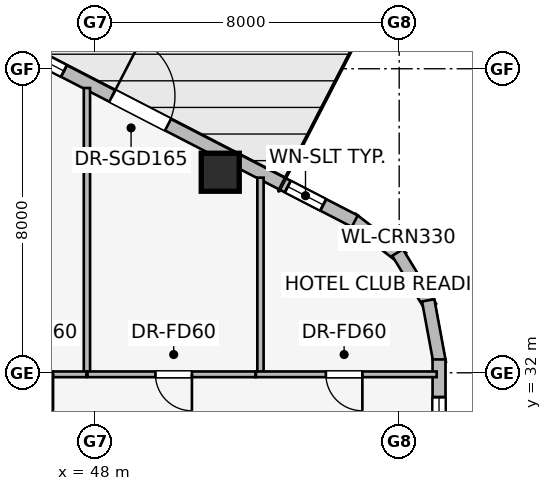
"""IFC4 building model, lengths in metres.
Left out: names, types, materials, properties, quantities, classifications, styles, units other than length and angle.
Written with IfcOpenShell. Run it as: python <this file> out.ifc"""

import sys

from ifc_helpers import new_model, si_unit, direction, frame, frame_2d, origin, origin_2d, place, context, subcontext, project, spatial, rectangle, extrude, element, fill, save


model = new_model("IFC4")
c1 = context("Model", 3, precision=1e-05, world=origin(), true_north=direction((0.0, 1.0)))
c2 = subcontext(c1, "Body", "Model", "MODEL_VIEW")
j1 = project(units=[si_unit("LENGTHUNIT", "METRE"), si_unit("PLANEANGLEUNIT", "RADIAN")], contexts=[c1])
p1 = place(None, origin())
s1 = spatial("IfcSite", under=j1, at=p1, CompositionType="ELEMENT")
p2 = place(p1, origin())
s2 = spatial("IfcBuilding", under=s1, at=p2, CompositionType="ELEMENT")
p3 = place(p2, frame((0.0, 0.0, 122.25)))
s3 = spatial("IfcBuildingStorey", under=s2, at=p3, CompositionType="ELEMENT", Elevation=122.25)
p4 = place(p3, frame((51.291, 37.277, 0.0), z_axis=(0.0, 0.0, 1.0), x_axis=(1.0, 0.0, 0.0)))
e1 = element("IfcColumn", 1, at=p4, inside=s3, PredefinedType="COLUMN", context=c2, shape_type="SweptSolid", body=[
    extrude(rectangle(XDim=1.0, YDim=1.0, at=origin_2d()), origin(), (0.0, 0.0, 1.0), 3.45),
])
p5 = place(p3, frame((54.757, 36.05, 0.0), z_axis=(0.0, 0.0, 1.0), x_axis=(0.790621329885, -0.612305408053, 0.0)))
e2 = element("IfcWall", 2, at=p5, inside=s3, PredefinedType="STANDARD", context=c2, shape_type="SweptSolid", body=[
    extrude(rectangle(XDim=1.676, YDim=0.33, at=frame_2d((0.838, 0.0))), origin(), (0.0, 0.0, 1.0), 3.19),
])
p6 = place(p3, frame((55.957, 35.164, 0.0), z_axis=(0.0, 0.0, 1.0), x_axis=(0.520519429557, -0.853849824883, 0.0)))
e3 = element("IfcWall", 3, at=p6, inside=s3, PredefinedType="STANDARD", context=c2, shape_type="SweptSolid", body=[
    extrude(rectangle(XDim=1.677, YDim=0.33, at=frame_2d((0.839, 0.0))), origin(), (0.0, 0.0, 1.0), 3.19),
])
p7 = place(p3, frame((56.763, 33.907, 0.0), z_axis=(0.0, 0.0, 1.0), x_axis=(0.181984991895, -0.983301308209, 0.0)))
e4 = element("IfcWall", 4, at=p7, inside=s3, PredefinedType="STANDARD", context=c2, shape_type="SweptSolid", body=[
    extrude(rectangle(XDim=1.677, YDim=0.33, at=frame_2d((0.838, 0.0))), origin(), (0.0, 0.0, 1.0), 3.19),
])
p8 = place(p3, frame((38.231, 44.558, 0.0), z_axis=(0.0, 0.0, 1.0), x_axis=(0.888613612362, -0.458656568606, 0.0)))
e5 = element("IfcWall", 5, at=p8, inside=s3, PredefinedType="STANDARD", context=c2, shape_type="SweptSolid", body=[
    extrude(rectangle(XDim=18.681, YDim=0.34, at=frame_2d((9.34, 0.0))), origin(), (0.0, 0.0, 1.0), 3.19),
])
p9 = place(p8, frame((11.5, 0.0, 0.0)))
e6 = element("IfcOpeningElement", 6, at=p9, cuts=e5, PredefinedType="OPENING", context=c2, shape_type="SweptSolid", body=[
    extrude(rectangle(XDim=1.65, YDim=2.25, at=frame_2d((0.825, 1.125))), frame((0.0, 0.18, 0.0), z_axis=(0.0, -1.0, 0.0), x_axis=(1.0, 0.0, 0.0)), (0.0, 0.0, 1.0), 0.36),
])
p10 = place(p8, frame((1.023, 0.0, 0.75)))
e7 = element("IfcOpeningElement", 7, at=p10, cuts=e5, PredefinedType="OPENING", context=c2, shape_type="SweptSolid", body=[
    extrude(rectangle(XDim=1.6, YDim=1.55, at=frame_2d((0.8, 0.775))), frame((0.0, 0.18, 0.0), z_axis=(0.0, -1.0, 0.0), x_axis=(1.0, 0.0, 0.0)), (0.0, 0.0, 1.0), 0.36),
])
p11 = place(p8, frame((5.135, 0.0, 0.75)))
e8 = element("IfcOpeningElement", 8, at=p11, cuts=e5, PredefinedType="OPENING", context=c2, shape_type="SweptSolid", body=[
    extrude(rectangle(XDim=2.1, YDim=1.5, at=frame_2d((1.05, 0.75))), frame((0.0, 0.18, 0.0), z_axis=(0.0, -1.0, 0.0), x_axis=(1.0, 0.0, 0.0)), (0.0, 0.0, 1.0), 0.36),
])
p12 = place(p8, frame((8.469, 0.0, 0.75)))
e9 = element("IfcOpeningElement", 9, at=p12, cuts=e5, PredefinedType="OPENING", context=c2, shape_type="SweptSolid", body=[
    extrude(rectangle(XDim=1.6, YDim=1.55, at=frame_2d((0.8, 0.775))), frame((0.0, 0.18, 0.0), z_axis=(0.0, -1.0, 0.0), x_axis=(1.0, 0.0, 0.0)), (0.0, 0.0, 1.0), 0.36),
])
p13 = place(p8, frame((16.697, 0.0, 0.75)))
e10 = element("IfcOpeningElement", 10, at=p13, cuts=e5, PredefinedType="OPENING", context=c2, shape_type="SweptSolid", body=[
    extrude(rectangle(XDim=1.05, YDim=1.4, at=frame_2d((0.525, 0.7))), frame((0.0, 0.18, 0.0), z_axis=(0.0, -1.0, 0.0), x_axis=(1.0, 0.0, 0.0)), (0.0, 0.0, 1.0), 0.36),
])
p14 = place(p3, frame((57.048, 32.352, 0.0), z_axis=(0.0, 0.0, 1.0), x_axis=(0.0, -1.0, 0.0)))
e11 = element("IfcWall", 11, at=p14, inside=s3, PredefinedType="STANDARD", context=c2, shape_type="SweptSolid", body=[
    extrude(rectangle(XDim=16.704, YDim=0.34, at=frame_2d((8.352, 0.0))), origin(), (0.0, 0.0, 1.0), 3.19),
])
p15 = place(p14, frame((0.992, 0.0, 0.75)))
e12 = element("IfcOpeningElement", 12, at=p15, cuts=e11, PredefinedType="OPENING", context=c2, shape_type="SweptSolid", body=[
    extrude(rectangle(XDim=1.05, YDim=1.4, at=frame_2d((0.525, 0.7))), frame((0.0, 0.18, 0.0), z_axis=(0.0, -1.0, 0.0), x_axis=(1.0, 0.0, 0.0)), (0.0, 0.0, 1.0), 0.36),
])
p16 = place(p14, frame((4.935, 0.0, 0.75)))
e13 = element("IfcOpeningElement", 13, at=p16, cuts=e11, PredefinedType="OPENING", context=c2, shape_type="SweptSolid", body=[
    extrude(rectangle(XDim=2.1, YDim=1.5, at=frame_2d((1.05, 0.75))), frame((0.0, 0.18, 0.0), z_axis=(0.0, -1.0, 0.0), x_axis=(1.0, 0.0, 0.0)), (0.0, 0.0, 1.0), 0.36),
])
p17 = place(p14, frame((9.919, 0.0, 0.75)))
e14 = element("IfcOpeningElement", 14, at=p17, cuts=e11, PredefinedType="OPENING", context=c2, shape_type="SweptSolid", body=[
    extrude(rectangle(XDim=1.6, YDim=1.55, at=frame_2d((0.8, 0.775))), frame((0.0, 0.18, 0.0), z_axis=(0.0, -1.0, 0.0), x_axis=(1.0, 0.0, 0.0)), (0.0, 0.0, 1.0), 0.36),
])
p18 = place(p14, frame((14.702, 0.0, 0.75)))
e15 = element("IfcOpeningElement", 15, at=p18, cuts=e11, PredefinedType="OPENING", context=c2, shape_type="SweptSolid", body=[
    extrude(rectangle(XDim=1.05, YDim=1.4, at=frame_2d((0.525, 0.7))), frame((0.0, 0.18, 0.0), z_axis=(0.0, -1.0, 0.0), x_axis=(1.0, 0.0, 0.0)), (0.0, 0.0, 1.0), 0.36),
])
p19 = place(p3, frame((47.783, 31.97, 0.0), z_axis=(0.0, 0.0, 1.0), x_axis=(0.0, 1.0, 0.0)))
e16 = element("IfcWall", 16, at=p19, inside=s3, PredefinedType="PARTITIONING", context=c2, shape_type="SweptSolid", body=[
    extrude(rectangle(XDim=7.523, YDim=0.165, at=frame_2d((3.761, 0.0))), origin(), (0.0, 0.0, 1.0), 3.19),
])
p20 = place(p3, frame((52.35, 31.97, 0.0), z_axis=(0.0, 0.0, 1.0), x_axis=(0.0, 1.0, 0.0)))
e17 = element("IfcWall", 17, at=p20, inside=s3, PredefinedType="PARTITIONING", context=c2, shape_type="SweptSolid", body=[
    extrude(rectangle(XDim=5.165, YDim=0.165, at=frame_2d((2.583, 0.0))), origin(), (0.0, 0.0, 1.0), 3.19),
])
p21 = place(p3, frame((47.767, 31.96, 0.0), z_axis=(0.0, 0.0, 1.0), x_axis=(-1.0, 0.0, 0.0)))
e18 = element("IfcWall", 18, at=p21, inside=s3, PredefinedType="PARTITIONING", context=c2, shape_type="SweptSolid", body=[
    extrude(rectangle(XDim=2.709, YDim=0.15, at=frame_2d((1.354, 0.0))), origin(), (0.0, 0.0, 1.0), 3.19),
])
p22 = place(p21, frame((0.875, 0.0, 0.0)))
e19 = element("IfcOpeningElement", 19, at=p22, cuts=e18, PredefinedType="OPENING", context=c2, shape_type="SweptSolid", body=[
    extrude(rectangle(XDim=0.96, YDim=2.0, at=frame_2d((0.48, 1.0))), frame((0.0, 0.085, 0.0), z_axis=(0.0, -1.0, 0.0), x_axis=(1.0, 0.0, 0.0)), (0.0, 0.0, 1.0), 0.17),
])
p23 = place(p3, frame((52.22, 31.96, 0.0), z_axis=(0.0, 0.0, 1.0), x_axis=(-1.0, 0.0, 0.0)))
e20 = element("IfcWall", 20, at=p23, inside=s3, PredefinedType="PARTITIONING", context=c2, shape_type="SweptSolid", body=[
    extrude(rectangle(XDim=4.421, YDim=0.15, at=frame_2d((2.21, 0.0))), origin(), (0.0, 0.0, 1.0), 3.19),
])
p24 = place(p23, frame((1.674, 0.0, 0.0)))
e21 = element("IfcOpeningElement", 21, at=p24, cuts=e20, PredefinedType="OPENING", context=c2, shape_type="SweptSolid", body=[
    extrude(rectangle(XDim=0.96, YDim=2.0, at=frame_2d((0.48, 1.0))), frame((0.0, 0.085, 0.0), z_axis=(0.0, -1.0, 0.0), x_axis=(1.0, 0.0, 0.0)), (0.0, 0.0, 1.0), 0.17),
])
p25 = place(p3, frame((56.987, 31.96, 0.0), z_axis=(0.0, 0.0, 1.0), x_axis=(-1.0, 0.0, 0.0)))
e22 = element("IfcWall", 22, at=p25, inside=s3, PredefinedType="PARTITIONING", context=c2, shape_type="SweptSolid", body=[
    extrude(rectangle(XDim=4.757, YDim=0.15, at=frame_2d((2.378, 0.0))), origin(), (0.0, 0.0, 1.0), 3.19),
])
p26 = place(p25, frame((1.956, 0.0, 0.0)))
e23 = element("IfcOpeningElement", 23, at=p26, cuts=e22, PredefinedType="OPENING", context=c2, shape_type="SweptSolid", body=[
    extrude(rectangle(XDim=0.96, YDim=2.0, at=frame_2d((0.48, 1.0))), frame((0.0, 0.085, 0.0), z_axis=(0.0, -1.0, 0.0), x_axis=(1.0, 0.0, 0.0)), (0.0, 0.0, 1.0), 0.17),
])
p27 = place(p9, origin())
e24 = element("IfcDoor", 24, at=p27, inside=s3, OperationType="SINGLE_SWING_LEFT", PredefinedType="DOOR", context=c2, shape_type="SweptSolid", body=[
    extrude(rectangle(XDim=1.65, YDim=2.25, at=frame_2d((0.825, 1.125))), frame((0.0, 0.025, 0.0), z_axis=(0.0, -1.0, 0.0), x_axis=(1.0, 0.0, 0.0)), (0.0, 0.0, 1.0), 0.05),
])
fill(e6, e24)
p28 = place(p12, origin())
e25 = element("IfcWindow", 25, at=p28, inside=s3, PartitioningType="SINGLE_PANEL", PredefinedType="WINDOW", context=c2, shape_type="SweptSolid", body=[
    extrude(rectangle(XDim=1.6, YDim=1.55, at=frame_2d((0.8, 0.775))), frame((0.0, 0.03, 0.0), z_axis=(0.0, -1.0, 0.0), x_axis=(1.0, 0.0, 0.0)), (0.0, 0.0, 1.0), 0.06),
])
fill(e9, e25)
p29 = place(p13, origin())
e26 = element("IfcWindow", 26, at=p29, inside=s3, PartitioningType="SINGLE_PANEL", PredefinedType="WINDOW", context=c2, shape_type="SweptSolid", body=[
    extrude(rectangle(XDim=1.05, YDim=1.4, at=frame_2d((0.525, 0.7))), frame((0.0, 0.03, 0.0), z_axis=(0.0, -1.0, 0.0), x_axis=(1.0, 0.0, 0.0)), (0.0, 0.0, 1.0), 0.06),
])
fill(e10, e26)
p30 = place(p15, origin())
e27 = element("IfcWindow", 27, at=p30, inside=s3, PartitioningType="SINGLE_PANEL", PredefinedType="WINDOW", context=c2, shape_type="SweptSolid", body=[
    extrude(rectangle(XDim=1.05, YDim=1.4, at=frame_2d((0.525, 0.7))), frame((0.0, 0.03, 0.0), z_axis=(0.0, -1.0, 0.0), x_axis=(1.0, 0.0, 0.0)), (0.0, 0.0, 1.0), 0.06),
])
fill(e12, e27)
p31 = place(p22, origin())
e28 = element("IfcDoor", 28, at=p31, inside=s3, OperationType="SINGLE_SWING_LEFT", PredefinedType="DOOR", context=c2, shape_type="SweptSolid", body=[
    extrude(rectangle(XDim=0.96, YDim=2.0, at=frame_2d((0.48, 1.0))), frame((0.0, 0.025, 0.0), z_axis=(0.0, -1.0, 0.0), x_axis=(1.0, 0.0, 0.0)), (0.0, 0.0, 1.0), 0.05),
])
fill(e19, e28)
p32 = place(p24, origin())
e29 = element("IfcDoor", 29, at=p32, inside=s3, OperationType="SINGLE_SWING_LEFT", PredefinedType="DOOR", context=c2, shape_type="SweptSolid", body=[
    extrude(rectangle(XDim=0.96, YDim=2.0, at=frame_2d((0.48, 1.0))), frame((0.0, 0.025, 0.0), z_axis=(0.0, -1.0, 0.0), x_axis=(1.0, 0.0, 0.0)), (0.0, 0.0, 1.0), 0.05),
])
fill(e21, e29)
p33 = place(p26, origin())
e30 = element("IfcDoor", 30, at=p33, inside=s3, OperationType="SINGLE_SWING_LEFT", PredefinedType="DOOR", context=c2, shape_type="SweptSolid", body=[
    extrude(rectangle(XDim=0.96, YDim=2.0, at=frame_2d((0.48, 1.0))), frame((0.0, 0.025, 0.0), z_axis=(0.0, -1.0, 0.0), x_axis=(1.0, 0.0, 0.0)), (0.0, 0.0, 1.0), 0.05),
])
fill(e23, e30)
save(model, sys.argv[1])
